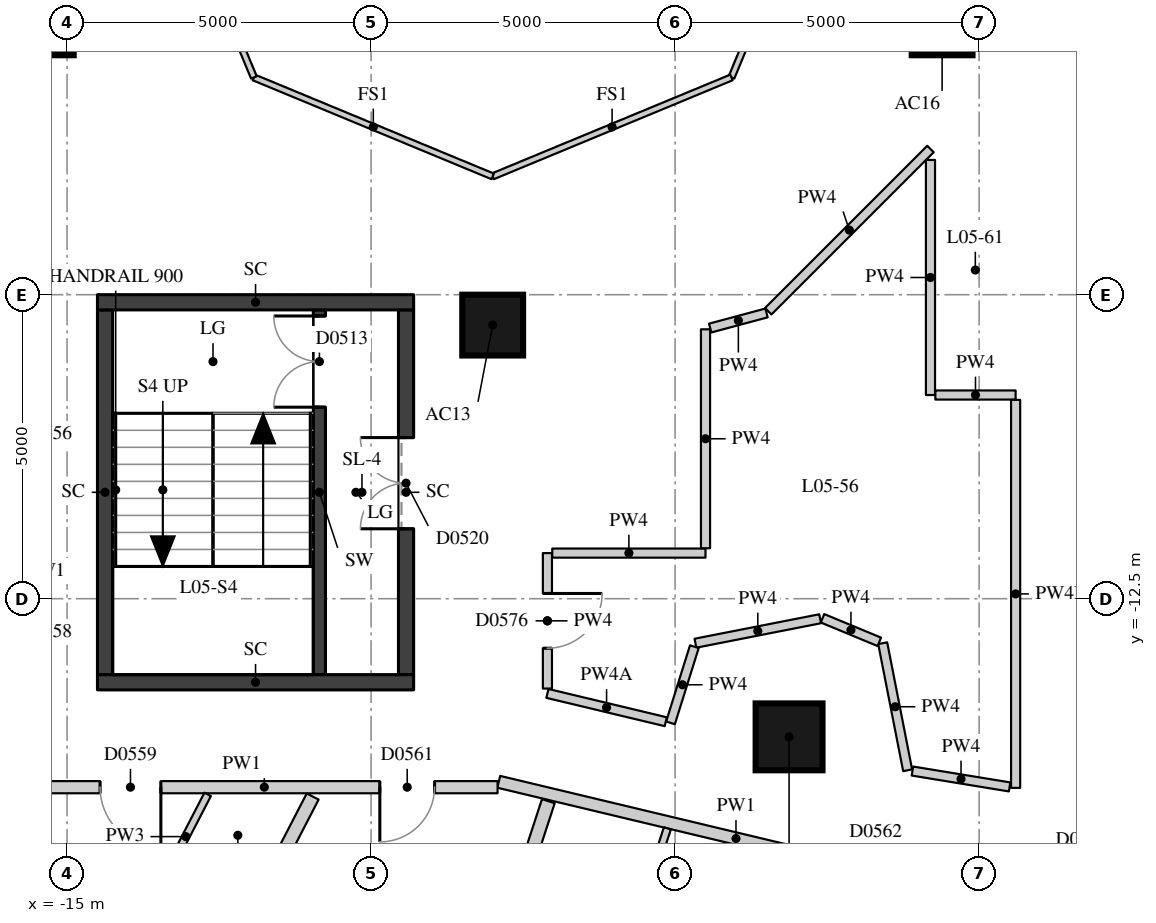
"""IFC4 building model, lengths in metres.
Left out: names, types, materials, properties, quantities, classifications, styles, units other than length and angle.
Written with IfcOpenShell. Run it as: python <this file> out.ifc"""

import sys

from ifc_helpers import new_model, si_unit, direction, frame, frame_2d, origin, origin_2d, place, context, subcontext, project, spatial, rectangle, extrude, element, fill, save


model = new_model("IFC4")
c1 = context("Model", 3, precision=1e-05, world=origin(), true_north=direction((0.0, 1.0)))
c2 = subcontext(c1, "Body", "Model", "MODEL_VIEW")
j1 = project(units=[si_unit("LENGTHUNIT", "METRE"), si_unit("PLANEANGLEUNIT", "RADIAN")], contexts=[c1])
p1 = place(None, origin())
s1 = spatial("IfcSite", under=j1, at=p1, CompositionType="ELEMENT")
p2 = place(p1, origin())
s2 = spatial("IfcBuilding", under=s1, at=p2, CompositionType="ELEMENT")
p3 = place(p2, frame((0.0, 0.0, 25.0)))
s3 = spatial("IfcBuildingStorey", under=s2, at=p3, CompositionType="ELEMENT", Elevation=25.0)
for number, where, z_axis, x_axis in (
    (1, (-15.391, -3.062, 0.0), (0.0, 0.0, 1.0), (1.0, 0.0, 0.0)),
    (2, (-8.0, -8.0, 0.0), (0.0, 0.0, 1.0), (1.0, 0.0, 0.0)),
    (3, (-0.609, -3.062, 0.0), (0.0, 0.0, 1.0), (1.0, 0.0, 0.0)),
):
    element("IfcColumn", number, at=place(p3, frame(where, z_axis=z_axis, x_axis=x_axis)), inside=s3, PredefinedType="COLUMN", context=c2, shape_type="SweptSolid", body=[
        extrude(rectangle(XDim=1.0, YDim=1.0, at=origin_2d()), origin(), (0.0, 0.0, 1.0), 3.3),
    ])
p4 = place(p3, frame((-3.126, -14.772, 0.0), z_axis=(0.0, 0.0, 1.0), x_axis=(1.0, 0.0, 0.0)))
e4 = element("IfcColumn", 4, at=p4, inside=s3, PredefinedType="COLUMN", context=c2, shape_type="SweptSolid", body=[
    extrude(rectangle(XDim=1.1, YDim=1.1, at=origin_2d()), origin(), (0.0, 0.0, 1.0), 3.3),
])
p5 = place(p3, frame((-10.85, -13.75, 0.0), z_axis=(0.0, 0.0, 1.0), x_axis=(0.0, 1.0, 0.0)))
e5 = element("IfcWall", 5, at=p5, inside=s3, PredefinedType="SHEAR", context=c2, shape_type="SweptSolid", body=[
    extrude(rectangle(XDim=6.0, YDim=0.2, at=frame_2d((3.0, 0.0))), origin(), (0.0, 0.0, 1.0), 3.02),
])
p6 = place(p5, frame((4.4, 0.0, 0.0)))
e6 = element("IfcOpeningElement", 6, at=p6, cuts=e5, PredefinedType="OPENING", context=c2, shape_type="SweptSolid", body=[
    extrude(rectangle(XDim=1.5, YDim=2.1, at=frame_2d((0.75, 1.05))), frame((0.0, 0.11, 0.0), z_axis=(0.0, -1.0, 0.0), x_axis=(1.0, 0.0, 0.0)), (0.0, 0.0, 1.0), 0.22),
])
p7 = place(p3, frame((-14.375, -13.75, -0.28), z_axis=(0.0, 0.0, 1.0), x_axis=(0.0, 1.0, 0.0)))
e7 = element("IfcWall", 7, at=p7, inside=s3, PredefinedType="SHEAR", context=c2, shape_type="SweptSolid", body=[
    extrude(rectangle(XDim=6.0, YDim=0.25, at=frame_2d((3.0, 0.0))), origin(), (0.0, 0.0, 1.0), 3.3),
])
p8 = place(p3, frame((-9.425, -13.75, -0.28), z_axis=(0.0, 0.0, 1.0), x_axis=(0.0, 1.0, 0.0)))
e8 = element("IfcWall", 8, at=p8, inside=s3, PredefinedType="SHEAR", context=c2, shape_type="SweptSolid", body=[
    extrude(rectangle(XDim=6.0, YDim=0.25, at=frame_2d((3.0, 0.0))), origin(), (0.0, 0.0, 1.0), 3.3),
])
p9 = place(p8, frame((2.4, 0.0, 0.28)))
e9 = element("IfcOpeningElement", 9, at=p9, cuts=e8, PredefinedType="OPENING", context=c2, shape_type="SweptSolid", body=[
    extrude(rectangle(XDim=1.5, YDim=2.1, at=frame_2d((0.75, 1.05))), frame((0.0, 0.135, 0.0), z_axis=(0.0, -1.0, 0.0), x_axis=(1.0, 0.0, 0.0)), (0.0, 0.0, 1.0), 0.27),
])
for number, where, z_axis, x_axis in (
    (10, (-14.5, -7.625, -0.28), (0.0, 0.0, 1.0), (1.0, 0.0, 0.0)),
    (11, (-14.5, -13.875, -0.28), (0.0, 0.0, 1.0), (1.0, 0.0, 0.0)),
):
    element("IfcWall", number, at=place(p3, frame(where, z_axis=z_axis, x_axis=x_axis)), inside=s3, PredefinedType="SHEAR", context=c2, shape_type="SweptSolid", body=[
        extrude(rectangle(XDim=5.2, YDim=0.25, at=frame_2d((2.6, 0.0))), origin(), (0.0, 0.0, 1.0), 3.3),
    ])
p10 = place(p3, frame((10.488, -14.893, 0.0), z_axis=(0.0, 0.0, 1.0), x_axis=(-0.972603489924, -0.23247032367, 0.0)))
e12 = element("IfcWall", 12, at=p10, inside=s3, PredefinedType="PARTITIONING", context=c2, shape_type="SweptSolid", body=[
    extrude(rectangle(XDim=10.783, YDim=0.2, at=frame_2d((5.392, 0.0))), origin(), (0.0, 0.0, 1.0), 3.02),
])
p11 = place(p10, frame((8.59, 0.0, 0.0)))
e13 = element("IfcOpeningElement", 13, at=p11, cuts=e12, PredefinedType="OPENING", context=c2, shape_type="SweptSolid", body=[
    extrude(rectangle(XDim=0.9, YDim=2.1, at=frame_2d((0.45, 1.05))), frame((0.0, 0.11, 0.0), z_axis=(0.0, -1.0, 0.0), x_axis=(1.0, 0.0, 0.0)), (0.0, 0.0, 1.0), 0.22),
])
p12 = place(p10, frame((5.462, 0.0, 0.0)))
e14 = element("IfcOpeningElement", 14, at=p12, cuts=e12, PredefinedType="OPENING", context=c2, shape_type="SweptSolid", body=[
    extrude(rectangle(XDim=1.0, YDim=2.1, at=frame_2d((0.5, 1.05))), frame((0.0, 0.11, 0.0), z_axis=(0.0, -1.0, 0.0), x_axis=(1.0, 0.0, 0.0)), (0.0, 0.0, 1.0), 0.22),
])
p13 = place(p3, frame((-0.098, -17.377, 0.0), z_axis=(0.0, 0.0, 1.0), x_axis=(-0.97260043732, 0.232483094708, 0.0)))
e15 = element("IfcWall", 15, at=p13, inside=s3, PredefinedType="PARTITIONING", context=c2, shape_type="SweptSolid", body=[
    extrude(rectangle(XDim=8.022, YDim=0.2, at=frame_2d((4.011, 0.0))), origin(), (0.0, 0.0, 1.0), 3.02),
])
p14 = place(p13, frame((1.643, 0.0, 0.0)))
e16 = element("IfcOpeningElement", 16, at=p14, cuts=e15, PredefinedType="OPENING", context=c2, shape_type="SweptSolid", body=[
    extrude(rectangle(XDim=1.1, YDim=2.1, at=frame_2d((0.55, 1.05))), frame((0.0, 0.11, 0.0), z_axis=(0.0, -1.0, 0.0), x_axis=(1.0, 0.0, 0.0)), (0.0, 0.0, 1.0), 0.22),
])
p15 = place(p3, frame((-7.92, -15.6, 0.0), z_axis=(0.0, 0.0, 1.0), x_axis=(-1.0, 0.0, 0.0)))
e17 = element("IfcWall", 17, at=p15, inside=s3, PredefinedType="PARTITIONING", context=c2, shape_type="SweptSolid", body=[
    extrude(rectangle(XDim=7.672, YDim=0.2, at=frame_2d((3.836, 0.0))), origin(), (0.0, 0.0, 1.0), 3.02),
])
p16 = place(p15, frame((5.537, 0.0, 0.0)))
e18 = element("IfcOpeningElement", 18, at=p16, cuts=e17, PredefinedType="OPENING", context=c2, shape_type="SweptSolid", body=[
    extrude(rectangle(XDim=1.0, YDim=2.1, at=frame_2d((0.5, 1.05))), frame((0.0, 0.11, 0.0), z_axis=(0.0, -1.0, 0.0), x_axis=(1.0, 0.0, 0.0)), (0.0, 0.0, 1.0), 0.22),
])
p17 = place(p15, frame((1.036, 0.0, 0.0)))
e19 = element("IfcOpeningElement", 19, at=p17, cuts=e17, PredefinedType="OPENING", context=c2, shape_type="SweptSolid", body=[
    extrude(rectangle(XDim=0.9, YDim=2.1, at=frame_2d((0.45, 1.05))), frame((0.0, 0.11, 0.0), z_axis=(0.0, -1.0, 0.0), x_axis=(1.0, 0.0, 0.0)), (0.0, 0.0, 1.0), 0.22),
])
p18 = place(p3, frame((-1.176, -15.322, 0.0), z_axis=(0.0, 0.0, 1.0), x_axis=(-0.192477233237, 0.981301439256, 0.0)))
e20 = element("IfcWall", 20, at=p18, inside=s3, PredefinedType="PARTITIONING", context=c2, shape_type="SweptSolid", body=[
    extrude(rectangle(XDim=2.13, YDim=0.15, at=frame_2d((1.065, 0.0))), origin(), (0.0, 0.0, 1.0), 3.02),
])
p19 = place(p3, frame((-1.641, -13.209, 0.0), z_axis=(0.0, 0.0, 1.0), x_axis=(-0.923725449546, 0.383055209937, 0.0)))
e21 = element("IfcWall", 21, at=p19, inside=s3, PredefinedType="PARTITIONING", context=c2, shape_type="SweptSolid", body=[
    extrude(rectangle(XDim=1.011, YDim=0.15, at=frame_2d((0.506, 0.0))), origin(), (0.0, 0.0, 1.0), 3.02),
])
p20 = place(p3, frame((-2.615, -12.83, 0.0), z_axis=(0.0, 0.0, 1.0), x_axis=(-0.981297312652, -0.192498270593, 0.0)))
e22 = element("IfcWall", 22, at=p20, inside=s3, PredefinedType="PARTITIONING", context=c2, shape_type="SweptSolid", body=[
    extrude(rectangle(XDim=2.09, YDim=0.15, at=frame_2d((1.045, 0.0))), origin(), (0.0, 0.0, 1.0), 3.02),
])
p21 = place(p3, frame((-4.683, -13.289, 0.0), z_axis=(0.0, 0.0, 1.0), x_axis=(-0.298931613931, -0.954274536071, 0.0)))
e23 = element("IfcWall", 23, at=p21, inside=s3, PredefinedType="PARTITIONING", context=c2, shape_type="SweptSolid", body=[
    extrude(rectangle(XDim=1.312, YDim=0.15, at=frame_2d((0.656, 0.0))), origin(), (0.0, 0.0, 1.0), 3.02),
])
p22 = place(p3, frame((-5.154, -14.523, 0.0), z_axis=(0.0, 0.0, 1.0), x_axis=(-0.97258848944, 0.232533073366, 0.0)))
e24 = element("IfcWall", 24, at=p22, inside=s3, PredefinedType="PARTITIONING", context=c2, shape_type="SweptSolid", body=[
    extrude(rectangle(XDim=2.001, YDim=0.15, at=frame_2d((1.0, 0.0))), origin(), (0.0, 0.0, 1.0), 2.57),
])
p23 = place(p3, frame((-7.1, -13.978, 0.0), z_axis=(0.0, 0.0, 1.0), x_axis=(0.0, 1.0, 0.0)))
e25 = element("IfcWall", 25, at=p23, inside=s3, PredefinedType="PARTITIONING", context=c2, shape_type="SweptSolid", body=[
    extrude(rectangle(XDim=2.228, YDim=0.15, at=frame_2d((1.114, 0.0))), origin(), (0.0, 0.0, 1.0), 3.02),
])
p24 = place(p23, frame((0.664, 0.0, 0.0)))
e26 = element("IfcOpeningElement", 26, at=p24, cuts=e25, PredefinedType="OPENING", context=c2, shape_type="SweptSolid", body=[
    extrude(rectangle(XDim=0.9, YDim=2.1, at=frame_2d((0.45, 1.05))), frame((0.0, 0.085, 0.0), z_axis=(0.0, -1.0, 0.0), x_axis=(1.0, 0.0, 0.0)), (0.0, 0.0, 1.0), 0.17),
])
p25 = place(p3, frame((-7.02, -11.75, 0.0), z_axis=(0.0, 0.0, 1.0), x_axis=(1.0, 0.0, 0.0)))
e27 = element("IfcWall", 27, at=p25, inside=s3, PredefinedType="PARTITIONING", context=c2, shape_type="SweptSolid", body=[
    extrude(rectangle(XDim=2.52, YDim=0.15, at=frame_2d((1.26, 0.0))), origin(), (0.0, 0.0, 1.0), 3.02),
])
p26 = place(p3, frame((-4.5, -11.67, 0.0), z_axis=(0.0, 0.0, 1.0), x_axis=(0.0, 1.0, 0.0)))
e28 = element("IfcWall", 28, at=p26, inside=s3, PredefinedType="PARTITIONING", context=c2, shape_type="SweptSolid", body=[
    extrude(rectangle(XDim=3.601, YDim=0.15, at=frame_2d((1.8, 0.0))), origin(), (0.0, 0.0, 1.0), 3.02),
])
p27 = place(p3, frame((-4.423, -8.049, 0.0), z_axis=(0.0, 0.0, 1.0), x_axis=(0.96590031435, 0.25891423819, 0.0)))
e29 = element("IfcWall", 29, at=p27, inside=s3, PredefinedType="PARTITIONING", context=c2, shape_type="SweptSolid", body=[
    extrude(rectangle(XDim=0.959, YDim=0.15, at=frame_2d((0.479, 0.0))), origin(), (0.0, 0.0, 1.0), 3.02),
])
p28 = place(p3, frame((-3.468, -7.772, 0.0), z_axis=(0.0, 0.0, 1.0), x_axis=(0.707106781187, 0.707106781187, 0.0)))
e30 = element("IfcWall", 30, at=p28, inside=s3, PredefinedType="PARTITIONING", context=c2, shape_type="SweptSolid", body=[
    extrude(rectangle(XDim=3.773, YDim=0.15, at=frame_2d((1.887, 0.0))), origin(), (0.0, 0.0, 1.0), 3.02),
])
p29 = place(p3, frame((-0.8, -5.284, 0.0), z_axis=(0.0, 0.0, 1.0), x_axis=(0.0, -1.0, 0.0)))
e31 = element("IfcWall", 31, at=p29, inside=s3, PredefinedType="PARTITIONING", context=c2, shape_type="SweptSolid", body=[
    extrude(rectangle(XDim=3.866, YDim=0.15, at=frame_2d((1.933, 0.0))), origin(), (0.0, 0.0, 1.0), 3.02),
])
p30 = place(p3, frame((-0.72, -9.15, 0.0), z_axis=(0.0, 0.0, 1.0), x_axis=(1.0, 0.0, 0.0)))
e32 = element("IfcWall", 32, at=p30, inside=s3, PredefinedType="PARTITIONING", context=c2, shape_type="SweptSolid", body=[
    extrude(rectangle(XDim=1.32, YDim=0.15, at=frame_2d((0.66, 0.0))), origin(), (0.0, 0.0, 1.0), 3.02),
])
p31 = place(p3, frame((0.6, -9.23, 0.0), z_axis=(0.0, 0.0, 1.0), x_axis=(0.0, -1.0, 0.0)))
e33 = element("IfcWall", 33, at=p31, inside=s3, PredefinedType="PARTITIONING", context=c2, shape_type="SweptSolid", body=[
    extrude(rectangle(XDim=6.382, YDim=0.15, at=frame_2d((3.191, 0.0))), origin(), (0.0, 0.0, 1.0), 2.47),
])
p32 = place(p3, frame((0.501, -15.596, 0.0), z_axis=(0.0, 0.0, 1.0), x_axis=(-0.986922601781, 0.161194845119, 0.0)))
e34 = element("IfcWall", 34, at=p32, inside=s3, PredefinedType="PARTITIONING", context=c2, shape_type="SweptSolid", body=[
    extrude(rectangle(XDim=1.619, YDim=0.15, at=frame_2d((0.81, 0.0))), origin(), (0.0, 0.0, 1.0), 3.02),
])
p33 = place(p3, frame((-13.78, -21.201, 0.0), z_axis=(0.0, 0.0, 1.0), x_axis=(0.459699000582, 0.888074787878, 0.0)))
e35 = element("IfcWall", 35, at=p33, inside=s3, PredefinedType="PARTITIONING", context=c2, shape_type="SweptSolid", body=[
    extrude(rectangle(XDim=6.134, YDim=0.22, at=frame_2d((3.067, 0.0))), origin(), (0.0, 0.0, 1.0), 3.02),
])
p34 = place(p3, frame((-9.429, -23.014, 0.0), z_axis=(0.0, 0.0, 1.0), x_axis=(0.310261176215, 0.950651356983, 0.0)))
e36 = element("IfcWall", 36, at=p34, inside=s3, PredefinedType="PARTITIONING", context=c2, shape_type="SweptSolid", body=[
    extrude(rectangle(XDim=7.557, YDim=0.22, at=frame_2d((3.779, 0.0))), origin(), (0.0, 0.0, 1.0), 3.02),
])
p35 = place(p3, frame((-12.687, -15.718, 0.0), z_axis=(0.0, 0.0, 1.0), x_axis=(-0.459775159711, -0.888035361071, 0.0)))
e37 = element("IfcWall", 37, at=p35, inside=s3, PredefinedType="PARTITIONING", context=c2, shape_type="SweptSolid", body=[
    extrude(rectangle(XDim=1.565, YDim=0.12, at=frame_2d((0.782, 0.0))), origin(), (0.0, 0.0, 1.0), 3.02),
])
p36 = place(p3, frame((-5.127, -16.277, 0.0), z_axis=(0.0, 0.0, 1.0), x_axis=(-0.310206676877, -0.950669142037, 0.0)))
e38 = element("IfcWall", 38, at=p36, inside=s3, PredefinedType="PARTITIONING", context=c2, shape_type="SweptSolid", body=[
    extrude(rectangle(XDim=2.862, YDim=0.12, at=frame_2d((1.431, 0.0))), origin(), (0.0, 0.0, 1.0), 3.02),
])
for number, where, z_axis, x_axis in (
    (39, (-2.446, 0.0, 0.0), (0.0, 0.0, 1.0), (-0.383, -0.924, 0.0)),
    (40, (-4.073, -3.927, 0.0), (0.0, 0.0, 1.0), (-0.924, -0.383, 0.0)),
    (41, (-8.0, -5.554, 0.0), (0.0, 0.0, 1.0), (-0.924, 0.383, 0.0)),
    (42, (-11.927, -3.927, 0.0), (0.0, 0.0, 1.0), (-0.383, 0.924, 0.0)),
):
    element("IfcWall", number, at=place(p3, frame(where, z_axis=z_axis, x_axis=x_axis)), inside=s3, PredefinedType="PARTITIONING", context=c2, shape_type="SweptSolid", body=[
        extrude(rectangle(XDim=4.251, YDim=0.1, at=frame_2d((2.125, 0.0))), origin(), (0.0, 0.0, 1.0), 3.02),
    ])
p37 = place(p6, origin())
e43 = element("IfcDoor", 43, at=p37, inside=s3, OperationType="DOUBLE_DOOR_SINGLE_SWING", PredefinedType="DOOR", context=c2, shape_type="SweptSolid", body=[
    extrude(rectangle(XDim=1.5, YDim=2.1, at=frame_2d((0.75, 1.05))), frame((0.0, 0.025, 0.0), z_axis=(0.0, -1.0, 0.0), x_axis=(1.0, 0.0, 0.0)), (0.0, 0.0, 1.0), 0.05),
])
fill(e6, e43)
p38 = place(p9, origin())
e44 = element("IfcDoor", 44, at=p38, inside=s3, OperationType="DOUBLE_DOOR_SINGLE_SWING", PredefinedType="DOOR", context=c2, shape_type="SweptSolid", body=[
    extrude(rectangle(XDim=1.5, YDim=2.1, at=frame_2d((0.75, 1.05))), frame((0.0, 0.025, 0.0), z_axis=(0.0, -1.0, 0.0), x_axis=(1.0, 0.0, 0.0)), (0.0, 0.0, 1.0), 0.05),
])
fill(e9, e44)
p39 = place(p16, origin())
e45 = element("IfcDoor", 45, at=p39, inside=s3, OperationType="SINGLE_SWING_LEFT", PredefinedType="DOOR", context=c2, shape_type="SweptSolid", body=[
    extrude(rectangle(XDim=1.0, YDim=2.1, at=frame_2d((0.5, 1.05))), frame((0.0, 0.025, 0.0), z_axis=(0.0, -1.0, 0.0), x_axis=(1.0, 0.0, 0.0)), (0.0, 0.0, 1.0), 0.05),
])
fill(e18, e45)
p40 = place(p17, origin())
e46 = element("IfcDoor", 46, at=p40, inside=s3, OperationType="SINGLE_SWING_RIGHT", PredefinedType="DOOR", context=c2, shape_type="SweptSolid", body=[
    extrude(rectangle(XDim=0.9, YDim=2.1, at=frame_2d((0.45, 1.05))), frame((0.0, 0.025, 0.0), z_axis=(0.0, -1.0, 0.0), x_axis=(1.0, 0.0, 0.0)), (0.0, 0.0, 1.0), 0.05),
])
fill(e19, e46)
p41 = place(p24, origin())
e47 = element("IfcDoor", 47, at=p41, inside=s3, OperationType="SINGLE_SWING_LEFT", PredefinedType="DOOR", context=c2, shape_type="SweptSolid", body=[
    extrude(rectangle(XDim=0.9, YDim=2.1, at=frame_2d((0.45, 1.05))), frame((0.0, 0.025, 0.0), z_axis=(0.0, -1.0, 0.0), x_axis=(1.0, 0.0, 0.0)), (0.0, 0.0, 1.0), 0.05),
])
fill(e26, e47)
save(model, sys.argv[1])
